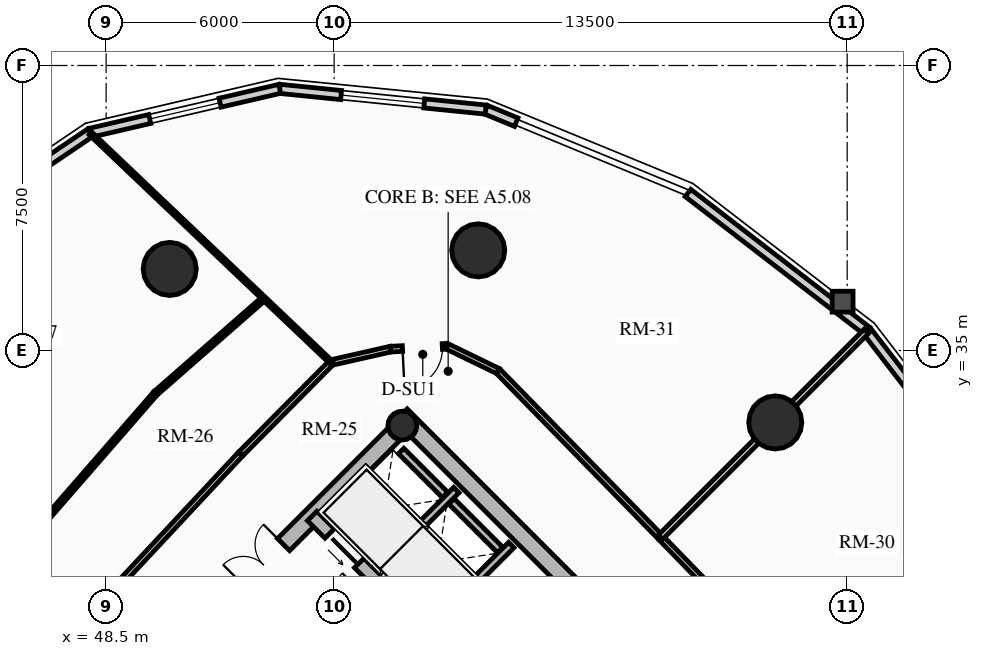
"""IFC4 building model, lengths in metres.
Left out: names, types, materials, properties, quantities, classifications, styles, units other than length and angle.
Written with IfcOpenShell. Run it as: python <this file> out.ifc"""

import sys

from ifc_helpers import new_model, si_unit, direction, frame, frame_2d, origin, origin_2d, place, context, subcontext, project, spatial, rectangle, circle, hollow_circle, extrude, source, transform, mapped, element, fill, save


model = new_model("IFC4")
c1 = context("Model", 3, precision=1e-05, world=origin(), true_north=direction((0.0, 1.0)))
c2 = subcontext(c1, "Body", "Model", "MODEL_VIEW")
j1 = project(units=[si_unit("LENGTHUNIT", "METRE"), si_unit("PLANEANGLEUNIT", "RADIAN")], contexts=[c1])
p1 = place(None, origin())
s1 = spatial("IfcSite", under=j1, at=p1, CompositionType="ELEMENT")
p2 = place(p1, origin())
s2 = spatial("IfcBuilding", under=s1, at=p2, CompositionType="ELEMENT")
p3 = place(p2, frame((0.0, 0.0, 125.44)))
s3 = spatial("IfcBuildingStorey", under=s2, at=p3, CompositionType="ELEMENT", Elevation=125.44)
p4 = place(p3, frame((66.303, 23.263, 0.0), z_axis=(0.0, 0.0, 1.0), x_axis=(-0.707106781187, 0.707106781187, 0.0)))
e1 = element("IfcWall", 1, at=p4, inside=s3, PredefinedType="SHEAR", context=c2, shape_type="SweptSolid", body=[
    extrude(rectangle(XDim=14.2, YDim=0.45, at=frame_2d((7.1, 0.0))), origin(), (0.0, 0.0, 1.0), 3.72),
])
p5 = place(p3, frame((48.856, 25.578, 0.0), z_axis=(0.0, 0.0, 1.0), x_axis=(0.707106781187, 0.707106781187, 0.0)))
e2 = element("IfcWall", 2, at=p5, inside=s3, PredefinedType="SHEAR", context=c2, shape_type="SweptSolid", body=[
    extrude(rectangle(XDim=10.7, YDim=0.45, at=frame_2d((5.35, 0.0))), origin(), (0.0, 0.0, 1.0), 3.72),
])
m1 = source(origin(), c2, "Body", "SweptSolid", [
    extrude(rectangle(XDim=1.5, YDim=2.02, at=frame_2d((0.75, 1.01))), frame((0.0, 0.235, 0.0), z_axis=(0.0, -1.0, 0.0), x_axis=(1.0, 0.0, 0.0)), (0.0, 0.0, 1.0), 0.47),
])
p6 = place(p5, frame((4.6, 0.0, 0.0)))
e3 = element("IfcOpeningElement", 3, at=p6, cuts=e2, PredefinedType="OPENING", context=c2, shape_type="MappedRepresentation", body=[
    mapped(m1, transform((0.0, 0.0, 0.0), x_axis=(1.0, 0.0, 0.0), y_axis=(0.0, 1.0, 0.0), z_axis=(0.0, 0.0, 1.0), scale=1.0)),
])
p7 = place(p3, frame((63.645, 20.922, 0.0), z_axis=(0.0, 0.0, 1.0), x_axis=(-0.707106781187, 0.707106781187, 0.0)))
e4 = element("IfcWall", 4, at=p7, inside=s3, PredefinedType="SHEAR", context=c2, shape_type="SweptSolid", body=[
    extrude(rectangle(XDim=13.75, YDim=0.35, at=frame_2d((6.875, 0.0))), origin(), (0.0, 0.0, 1.0), 3.72),
])
m2 = source(origin(), c2, "Body", "SweptSolid", [
    extrude(rectangle(XDim=1.1, YDim=2.015, at=frame_2d((0.55, 1.007))), frame((0.0, 0.185, 0.0), z_axis=(0.0, -1.0, 0.0), x_axis=(1.0, 0.0, 0.0)), (0.0, 0.0, 1.0), 0.37),
])
p8 = place(p7, frame((10.0, 0.0, 0.0)))
e5 = element("IfcOpeningElement", 5, at=p8, cuts=e4, PredefinedType="OPENING", context=c2, shape_type="MappedRepresentation", body=[
    mapped(m2, transform((0.0, 0.0, 0.0), x_axis=(1.0, 0.0, 0.0), y_axis=(0.0, 1.0, 0.0), z_axis=(0.0, 0.0, 1.0), scale=1.0)),
])
p9 = place(p7, frame((12.0, 0.0, 0.0)))
e6 = element("IfcOpeningElement", 6, at=p9, cuts=e4, PredefinedType="OPENING", context=c2, shape_type="MappedRepresentation", body=[
    mapped(m2, transform((0.0, 0.0, 0.0), x_axis=(1.0, 0.0, 0.0), y_axis=(0.0, 1.0, 0.0), z_axis=(0.0, 0.0, 1.0), scale=1.0)),
])
m3 = source(origin(), c2, "Body", "SweptSolid", [
    extrude(rectangle(XDim=1.15, YDim=2.02, at=frame_2d((0.575, 1.01))), frame((0.0, 0.185, 0.0), z_axis=(0.0, -1.0, 0.0), x_axis=(1.0, 0.0, 0.0)), (0.0, 0.0, 1.0), 0.37),
])
p10 = place(p7, frame((5.305, 0.0, 0.0)))
e7 = element("IfcOpeningElement", 7, at=p10, cuts=e4, PredefinedType="OPENING", context=c2, shape_type="MappedRepresentation", body=[
    mapped(m3, transform((0.0, 0.0, 0.0), x_axis=(1.0, 0.0, 0.0), y_axis=(0.0, 1.0, 0.0), z_axis=(0.0, 0.0, 1.0), scale=1.0)),
])
p11 = place(p3, frame((56.294, 33.024, 0.0), z_axis=(0.0, 0.0, 1.0), x_axis=(0.707106781187, 0.707106781187, 0.0)))
e8 = element("IfcColumn", 8, at=p11, inside=s3, PredefinedType="COLUMN", context=c2, shape_type="SweptSolid", body=[
    extrude(hollow_circle(Radius=0.38, WallThickness=0.032, at=origin_2d()), origin(), (0.0, 0.0, 1.0), 3.72),
])
for number, where, z_axis, x_axis in (
    (9, (66.107, 33.107, 0.0), (0.0, 0.0, 1.0), (1.0, 0.0, 0.0)),
    (10, (58.291, 37.635, 0.0), (0.0, 0.0, 1.0), (1.0, 0.0, 0.0)),
    (11, (50.173, 37.146, 0.0), (0.0, 0.0, 1.0), (1.0, 0.0, 0.0)),
):
    element("IfcColumn", number, at=place(p3, frame(where, z_axis=z_axis, x_axis=x_axis)), inside=s3, PredefinedType="USERDEFINED", context=c2, shape_type="SweptSolid", body=[
        extrude(circle(Radius=0.7, at=origin_2d()), origin(), (0.0, 0.0, 1.0), 3.72),
    ])
p12 = place(p3, frame((63.811, 39.145, 0.0), z_axis=(0.0, 0.0, 1.0), x_axis=(0.791982052206, -0.61054437102, 0.0)))
e12 = element("IfcWall", 12, at=p12, inside=s3, PredefinedType="SOLIDWALL", context=c2, shape_type="SweptSolid", body=[
    extrude(rectangle(XDim=5.942, YDim=0.24, at=frame_2d((2.971, 0.0))), origin(), (0.0, 0.0, 1.0), 2.949),
])
p13 = place(p3, frame((58.487, 41.339, 0.0), z_axis=(0.0, 0.0, 1.0), x_axis=(0.924556017656, -0.381046152345, 0.0)))
e13 = element("IfcWall", 13, at=p13, inside=s3, PredefinedType="SOLIDWALL", context=c2, shape_type="SweptSolid", body=[
    extrude(rectangle(XDim=0.87, YDim=0.24, at=frame_2d((0.435, 0.0))), origin(), (0.0, 0.0, 1.0), 2.949),
])
p14 = place(p3, frame((53.067, 41.885, 0.0), z_axis=(0.0, 0.0, 1.0), x_axis=(0.994971754311, -0.10015591906, 0.0)))
e14 = element("IfcWall", 14, at=p14, inside=s3, PredefinedType="SOLIDWALL", context=c2, shape_type="SweptSolid", body=[
    extrude(rectangle(XDim=5.448, YDim=0.24, at=frame_2d((2.724, 0.0))), origin(), (0.0, 0.0, 1.0), 2.949),
])
m4 = source(origin(), c2, "Body", "SweptSolid", [
    extrude(rectangle(XDim=2.2, YDim=1.35, at=frame_2d((1.1, 0.675))), frame((0.0, 0.13, 0.0), z_axis=(0.0, -1.0, 0.0), x_axis=(1.0, 0.0, 0.0)), (0.0, 0.0, 1.0), 0.26),
])
p15 = place(p14, frame((1.624, 0.0, 0.65)))
e15 = element("IfcOpeningElement", 15, at=p15, cuts=e14, PredefinedType="OPENING", context=c2, shape_type="MappedRepresentation", body=[
    mapped(m4, transform((0.0, 0.0, 0.0), x_axis=(1.0, 0.0, 0.0), y_axis=(0.0, 1.0, 0.0), z_axis=(0.0, 0.0, 1.0), scale=1.0)),
])
p16 = place(p3, frame((48.08, 40.729, 0.0), z_axis=(0.0, 0.0, 1.0), x_axis=(0.974165631126, 0.225834725257, 0.0)))
e16 = element("IfcWall", 16, at=p16, inside=s3, PredefinedType="SOLIDWALL", context=c2, shape_type="SweptSolid", body=[
    extrude(rectangle(XDim=5.119, YDim=0.24, at=frame_2d((2.56, 0.0))), origin(), (0.0, 0.0, 1.0), 2.949),
])
m5 = source(origin(), c2, "Body", "SweptSolid", [
    extrude(rectangle(XDim=1.9, YDim=1.35, at=frame_2d((0.95, 0.675))), frame((0.0, 0.13, 0.0), z_axis=(0.0, -1.0, 0.0), x_axis=(1.0, 0.0, 0.0)), (0.0, 0.0, 1.0), 0.26),
])
p17 = place(p16, frame((1.609, 0.0, 0.65)))
e17 = element("IfcOpeningElement", 17, at=p17, cuts=e16, PredefinedType="OPENING", context=c2, shape_type="MappedRepresentation", body=[
    mapped(m5, transform((0.0, 0.0, 0.0), x_axis=(1.0, 0.0, 0.0), y_axis=(0.0, 1.0, 0.0), z_axis=(0.0, 0.0, 1.0), scale=1.0)),
])
p18 = place(p3, frame((44.015, 37.985, 0.0), z_axis=(0.0, 0.0, 1.0), x_axis=(0.828781148131, 0.559572880421, 0.0)))
e18 = element("IfcWall", 18, at=p18, inside=s3, PredefinedType="SOLIDWALL", context=c2, shape_type="SweptSolid", body=[
    extrude(rectangle(XDim=4.905, YDim=0.24, at=frame_2d((2.452, 0.0))), origin(), (0.0, 0.0, 1.0), 2.949),
])
p19 = place(p3, frame((68.517, 35.517, 0.0), z_axis=(0.0, 0.0, 1.0), x_axis=(0.61054437102, -0.791982052206, 0.0)))
e19 = element("IfcWall", 19, at=p19, inside=s3, PredefinedType="SOLIDWALL", context=c2, shape_type="SweptSolid", body=[
    extrude(rectangle(XDim=5.942, YDim=0.24, at=frame_2d((2.971, 0.0))), origin(), (0.0, 0.0, 1.0), 2.949),
])
p20 = place(p19, frame((2.021, 0.0, 0.65)))
e20 = element("IfcOpeningElement", 20, at=p20, cuts=e19, PredefinedType="OPENING", context=c2, shape_type="MappedRepresentation", body=[
    mapped(m5, transform((0.0, 0.0, 0.0), x_axis=(1.0, 0.0, 0.0), y_axis=(0.0, 1.0, 0.0), z_axis=(0.0, 0.0, 1.0), scale=1.0)),
])
p21 = place(p3, frame((57.062, 27.781, 0.0), z_axis=(0.0, 0.0, 1.0), x_axis=(0.707106781187, 0.707106781187, 0.0)))
e21 = element("IfcWall", 21, at=p21, inside=s3, PredefinedType="SHEAR", context=c2, shape_type="SweptSolid", body=[
    extrude(rectangle(XDim=2.97, YDim=0.2, at=frame_2d((1.485, 0.0))), origin(), (0.0, 0.0, 1.0), 3.72),
])
p22 = place(p3, frame((55.615, 29.227, 0.0), z_axis=(0.0, 0.0, 1.0), x_axis=(0.707147878904, 0.70706568108, 0.0)))
e22 = element("IfcWall", 22, at=p22, inside=s3, PredefinedType="SHEAR", context=c2, shape_type="SweptSolid", body=[
    extrude(rectangle(XDim=2.97, YDim=0.2, at=frame_2d((1.485, 0.0))), origin(), (0.0, 0.0, 1.0), 3.72),
])
p23 = place(p3, frame((58.865, 29.754, 0.0), z_axis=(0.0, 0.0, 1.0), x_axis=(-0.707174411312, 0.707039144592, 0.0)))
e23 = element("IfcWall", 23, at=p23, inside=s3, PredefinedType="SHEAR", context=c2, shape_type="SweptSolid", body=[
    extrude(rectangle(XDim=1.805, YDim=0.2, at=frame_2d((0.902, 0.0))), origin(), (0.0, 0.0, 1.0), 3.72),
])
p24 = place(p3, frame((57.419, 31.2, 0.0), z_axis=(0.0, 0.0, 1.0), x_axis=(-0.707032117043, 0.707181437447, 0.0)))
e24 = element("IfcWall", 24, at=p24, inside=s3, PredefinedType="SHEAR", context=c2, shape_type="SweptSolid", body=[
    extrude(rectangle(XDim=1.635, YDim=0.2, at=frame_2d((0.817, 0.0))), origin(), (0.0, 0.0, 1.0), 3.72),
])
p25 = place(p3, frame((63.086, 30.086, 0.0), z_axis=(0.0, 0.0, 1.0), x_axis=(-0.699075897379, 0.715047473741, 0.0)))
e25 = element("IfcWall", 25, at=p25, inside=s3, PredefinedType="PARTITIONING", context=c2, shape_type="SweptSolid", body=[
    extrude(rectangle(XDim=6.114, YDim=0.15, at=frame_2d((3.057, 0.0))), origin(), (0.0, 0.0, 1.0), 2.995),
])
p26 = place(p3, frame((58.812, 34.458, 0.0), z_axis=(0.0, 0.0, 1.0), x_axis=(-0.899559490277, 0.436798264021, 0.0)))
e26 = element("IfcWall", 26, at=p26, inside=s3, PredefinedType="PARTITIONING", context=c2, shape_type="SweptSolid", body=[
    extrude(rectangle(XDim=1.495, YDim=0.15, at=frame_2d((0.748, 0.0))), origin(), (0.0, 0.0, 1.0), 2.995),
])
p27 = place(p3, frame((57.467, 35.111, 0.0), z_axis=(0.0, 0.0, 1.0), x_axis=(-0.998691757323, -0.051134859488, 0.0)))
e27 = element("IfcWall", 27, at=p27, inside=s3, PredefinedType="PARTITIONING", context=c2, shape_type="SweptSolid", body=[
    extrude(rectangle(XDim=1.485, YDim=0.15, at=frame_2d((0.742, 0.0))), origin(), (0.0, 0.0, 1.0), 2.995),
])
m6 = source(origin(), c2, "Body", "SweptSolid", [
    extrude(rectangle(XDim=1.05, YDim=2.015, at=frame_2d((0.525, 1.007))), frame((0.0, 0.085, 0.0), z_axis=(0.0, -1.0, 0.0), x_axis=(1.0, 0.0, 0.0)), (0.0, 0.0, 1.0), 0.17),
])
p28 = place(p27, frame((0.12, 0.0, 0.0)))
e28 = element("IfcOpeningElement", 28, at=p28, cuts=e27, PredefinedType="OPENING", context=c2, shape_type="MappedRepresentation", body=[
    mapped(m6, transform((0.0, 0.0, 0.0), x_axis=(1.0, 0.0, 0.0), y_axis=(0.0, 1.0, 0.0), z_axis=(0.0, 0.0, 1.0), scale=1.0)),
])
p29 = place(p3, frame((55.984, 35.035, 0.0), z_axis=(0.0, 0.0, 1.0), x_axis=(-0.975290305708, -0.22092718165, 0.0)))
e29 = element("IfcWall", 29, at=p29, inside=s3, PredefinedType="PARTITIONING", context=c2, shape_type="SweptSolid", body=[
    extrude(rectangle(XDim=1.597, YDim=0.15, at=frame_2d((0.798, 0.0))), origin(), (0.0, 0.0, 1.0), 2.995),
])
p30 = place(p3, frame((54.427, 34.683, 0.0), z_axis=(0.0, 0.0, 1.0), x_axis=(-0.704178989986, -0.710022499687, 0.0)))
e30 = element("IfcWall", 30, at=p30, inside=s3, PredefinedType="PARTITIONING", context=c2, shape_type="SweptSolid", body=[
    extrude(rectangle(XDim=3.384, YDim=0.15, at=frame_2d((1.692, 0.0))), origin(), (0.0, 0.0, 1.0), 2.995),
])
p31 = place(p3, frame((52.043, 32.28, 0.0), z_axis=(0.0, 0.0, 1.0), x_axis=(-0.682606081633, -0.730786519661, 0.0)))
e31 = element("IfcWall", 31, at=p31, inside=s3, PredefinedType="PARTITIONING", context=c2, shape_type="SweptSolid", body=[
    extrude(rectangle(XDim=6.527, YDim=0.15, at=frame_2d((3.263, 0.0))), origin(), (0.0, 0.0, 1.0), 2.995),
])
p32 = place(p3, frame((67.27, 25.78, 0.0), z_axis=(0.0, 0.0, 1.0), x_axis=(-0.696847842907, 0.717218992942, 0.0)))
e32 = element("IfcWall", 32, at=p32, inside=s3, PredefinedType="PARTITIONING", context=c2, shape_type="SweptSolid", body=[
    extrude(rectangle(XDim=6.004, YDim=0.15, at=frame_2d((3.002, 0.0))), origin(), (0.0, 0.0, 1.0), 3.425),
])
p33 = place(p3, frame((63.086, 30.086, 0.0), z_axis=(0.0, 0.0, 1.0), x_axis=(0.707106781187, 0.707106781187, 0.0)))
e33 = element("IfcWall", 33, at=p33, inside=s3, PredefinedType="PARTITIONING", context=c2, shape_type="SweptSolid", body=[
    extrude(rectangle(XDim=7.661, YDim=0.16, at=frame_2d((3.831, 0.0))), origin(), (0.0, 0.0, 1.0), 2.949),
])
p34 = place(p3, frame((54.427, 34.683, 0.0), z_axis=(0.0, 0.0, 1.0), x_axis=(-0.72454072322, 0.689231993161, 0.0)))
e34 = element("IfcWall", 34, at=p34, inside=s3, PredefinedType="MOVABLE", context=c2, shape_type="SweptSolid", body=[
    extrude(rectangle(XDim=8.747, YDim=0.1, at=frame_2d((4.374, 0.0))), origin(), (0.0, 0.0, 1.0), 2.949),
])
p35 = place(p3, frame((52.652, 36.371, 0.0), z_axis=(0.0, 0.0, 1.0), x_axis=(-0.752401146533, -0.658705180408, 0.0)))
e35 = element("IfcWall", 35, at=p35, inside=s3, PredefinedType="PARTITIONING", context=c2, shape_type="SweptSolid", body=[
    extrude(rectangle(XDim=3.791, YDim=0.125, at=frame_2d((1.896, 0.0))), origin(), (0.0, 0.0, 1.0), 2.995),
])
p36 = place(p3, frame((49.8, 33.873, 0.0), z_axis=(0.0, 0.0, 1.0), x_axis=(-0.656224613926, -0.754565607537, 0.0)))
e36 = element("IfcWall", 36, at=p36, inside=s3, PredefinedType="PARTITIONING", context=c2, shape_type="SweptSolid", body=[
    extrude(rectangle(XDim=6.058, YDim=0.125, at=frame_2d((3.029, 0.0))), origin(), (0.0, 0.0, 1.0), 2.995),
])
m7 = source(origin(), c2, "Body", "SweptSolid", [
    extrude(rectangle(XDim=2.2, YDim=1.35, at=frame_2d((1.1, 0.675))), frame((0.0, 0.03, 0.0), z_axis=(0.0, -1.0, 0.0), x_axis=(1.0, 0.0, 0.0)), (0.0, 0.0, 1.0), 0.06),
])
p37 = place(p15, origin())
e37 = element("IfcWindow", 37, at=p37, inside=s3, PartitioningType="DOUBLE_PANEL_VERTICAL", PredefinedType="WINDOW", context=c2, shape_type="MappedRepresentation", body=[
    mapped(m7, transform((0.0, 0.0, 0.0), x_axis=(1.0, 0.0, 0.0), y_axis=(0.0, 1.0, 0.0), z_axis=(0.0, 0.0, 1.0), scale=1.0)),
])
fill(e15, e37)
m8 = source(origin(), c2, "Body", "SweptSolid", [
    extrude(rectangle(XDim=1.9, YDim=1.35, at=frame_2d((0.95, 0.675))), frame((0.0, 0.03, 0.0), z_axis=(0.0, -1.0, 0.0), x_axis=(1.0, 0.0, 0.0)), (0.0, 0.0, 1.0), 0.06),
])
p38 = place(p17, origin())
e38 = element("IfcWindow", 38, at=p38, inside=s3, PartitioningType="DOUBLE_PANEL_VERTICAL", PredefinedType="WINDOW", context=c2, shape_type="MappedRepresentation", body=[
    mapped(m8, transform((0.0, 0.0, 0.0), x_axis=(1.0, 0.0, 0.0), y_axis=(0.0, 1.0, 0.0), z_axis=(0.0, 0.0, 1.0), scale=1.0)),
])
fill(e17, e38)
m9 = source(origin(), c2, "Body", "SweptSolid", [
    extrude(rectangle(XDim=1.1, YDim=2.015, at=frame_2d((0.55, 1.007))), frame((0.0, 0.025, 0.0), z_axis=(0.0, -1.0, 0.0), x_axis=(1.0, 0.0, 0.0)), (0.0, 0.0, 1.0), 0.05),
])
p39 = place(p9, origin())
e39 = element("IfcDoor", 39, at=p39, inside=s3, OperationType="SLIDING_TO_LEFT", PredefinedType="DOOR", context=c2, shape_type="MappedRepresentation", body=[
    mapped(m9, transform((0.0, 0.0, 0.0), x_axis=(1.0, 0.0, 0.0), y_axis=(0.0, 1.0, 0.0), z_axis=(0.0, 0.0, 1.0), scale=1.0)),
])
fill(e6, e39)
m10 = source(origin(), c2, "Body", "SweptSolid", [
    extrude(rectangle(XDim=1.5, YDim=2.02, at=frame_2d((0.75, 1.01))), frame((0.0, 0.025, 0.0), z_axis=(0.0, -1.0, 0.0), x_axis=(1.0, 0.0, 0.0)), (0.0, 0.0, 1.0), 0.05),
])
p40 = place(p6, origin())
e40 = element("IfcDoor", 40, at=p40, inside=s3, OperationType="DOUBLE_DOOR_SINGLE_SWING", PredefinedType="DOOR", context=c2, shape_type="MappedRepresentation", body=[
    mapped(m10, transform((0.0, 0.0, 0.0), x_axis=(1.0, 0.0, 0.0), y_axis=(0.0, 1.0, 0.0), z_axis=(0.0, 0.0, 1.0), scale=1.0)),
])
fill(e3, e40)
m11 = source(origin(), c2, "Body", "SweptSolid", [
    extrude(rectangle(XDim=1.05, YDim=2.015, at=frame_2d((0.525, 1.007))), frame((0.0, 0.025, 0.0), z_axis=(0.0, -1.0, 0.0), x_axis=(1.0, 0.0, 0.0)), (0.0, 0.0, 1.0), 0.05),
])
p41 = place(p28, origin())
e41 = element("IfcDoor", 41, at=p41, inside=s3, OperationType="SINGLE_SWING_RIGHT", PredefinedType="DOOR", context=c2, shape_type="MappedRepresentation", body=[
    mapped(m11, transform((0.0, 0.0, 0.0), x_axis=(1.0, 0.0, 0.0), y_axis=(0.0, 1.0, 0.0), z_axis=(0.0, 0.0, 1.0), scale=1.0)),
])
fill(e28, e41)
save(model, sys.argv[1])
